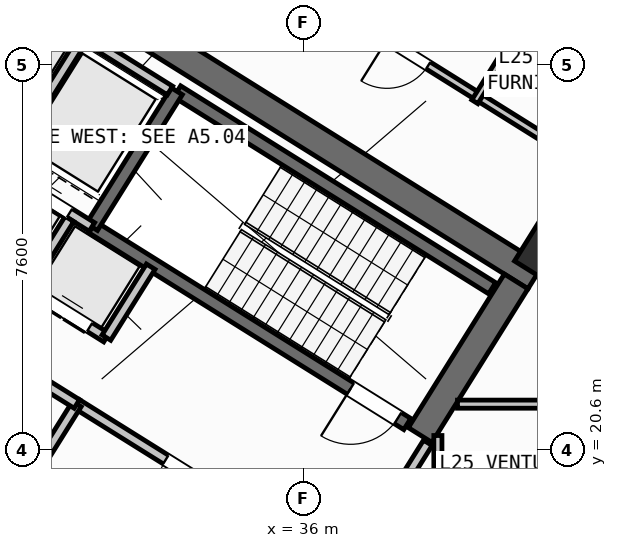
"""IFC4 building model, lengths in metres.
Left out: names, types, materials, properties, quantities, classifications, styles, units other than length and angle.
Written with IfcOpenShell. Run it as: python <this file> out.ifc"""

import sys

from ifc_helpers import new_model, si_unit, direction, frame, frame_2d, origin, origin_2d, place, context, subcontext, project, spatial, rectangle, hollow_rectangle, extrude, source, transform, mapped, element, fill, save


model = new_model("IFC4")
c1 = context("Model", 3, precision=1e-05, world=origin(), true_north=direction((0.0, 1.0)))
c2 = subcontext(c1, "Body", "Model", "MODEL_VIEW")
j1 = project(units=[si_unit("LENGTHUNIT", "METRE"), si_unit("PLANEANGLEUNIT", "RADIAN")], contexts=[c1])
p1 = place(None, origin())
s1 = spatial("IfcSite", under=j1, at=p1, CompositionType="ELEMENT")
p2 = place(p1, origin())
s2 = spatial("IfcBuilding", under=s1, at=p2, CompositionType="ELEMENT")
p3 = place(p2, frame((0.0, 0.0, 100.8)))
s3 = spatial("IfcBuildingStorey", under=s2, at=p3, CompositionType="ELEMENT", Elevation=100.8)
p4 = place(p3, frame((40.573, 24.01, 0.0), z_axis=(0.0, 0.0, 1.0), x_axis=(-0.848047359947, 0.529920442413, 0.0)))
e1 = element("IfcWall", 1, at=p4, inside=s3, PredefinedType="SHEAR", context=c2, shape_type="SweptSolid", body=[
    extrude(rectangle(XDim=13.14, YDim=0.55, at=frame_2d((6.57, 0.0))), origin(), (0.0, 0.0, 1.0), 4.25),
])
p5 = place(p3, frame((40.194, 23.922, 0.0), z_axis=(0.0, 0.0, 1.0), x_axis=(-0.529888438328, -0.848067357541, 0.0)))
e2 = element("IfcWall", 2, at=p5, inside=s3, PredefinedType="SHEAR", context=c2, shape_type="SweptSolid", body=[
    extrude(rectangle(XDim=3.575, YDim=0.55, at=frame_2d((1.788, 0.0))), origin(), (0.0, 0.0, 1.0), 4.25),
])
m1 = source(origin(), c2, "Body", "SweptSolid", [
    extrude(hollow_rectangle(XDim=0.9, YDim=0.9, WallThickness=0.036, at=origin_2d()), origin(), (0.0, 0.0, 1.0), 4.5),
])
p6 = place(p3, frame((40.783, 24.469, 0.0), z_axis=(0.0, 0.0, 1.0), x_axis=(-0.848048096156, 0.529919264233, 0.0)))
e3 = element("IfcColumn", 3, at=p6, inside=s3, PredefinedType="COLUMN", context=c2, shape_type="MappedRepresentation", body=[
    mapped(m1, transform((0.0, 0.0, 0.0), scale=1.0)),
])
p7 = place(p3, frame((31.76, 12.183, 0.0), z_axis=(0.0, 0.0, 1.0), x_axis=(-0.848047074256, 0.529920899612, 0.0)))
e4 = element("IfcWall", 4, at=p7, inside=s3, PredefinedType="STANDARD", context=c2, shape_type="SweptSolid", body=[
    extrude(rectangle(XDim=30.652, YDim=0.32, at=frame_2d((15.326, 0.0))), origin(), (0.0, 0.0, 1.0), 4.25),
])
p8 = place(p7, frame((15.153, 0.0, 0.0)))
e5 = element("IfcOpeningElement", 5, at=p8, cuts=e4, PredefinedType="OPENING", context=c2, shape_type="SweptSolid", body=[
    extrude(rectangle(XDim=1.2, YDim=2.15, at=frame_2d((0.6, 1.075))), frame((0.0, 0.17, 0.0), z_axis=(0.0, -1.0, 0.0), x_axis=(1.0, 0.0, 0.0)), (0.0, 0.0, 1.0), 0.34),
])
p9 = place(p7, frame((1.652, 0.0, 0.65)))
e6 = element("IfcOpeningElement", 6, at=p9, cuts=e4, PredefinedType="OPENING", context=c2, shape_type="SweptSolid", body=[
    extrude(rectangle(XDim=2.8, YDim=2.1, at=frame_2d((1.4, 1.05))), frame((0.0, 0.17, 0.0), z_axis=(0.0, -1.0, 0.0), x_axis=(1.0, 0.0, 0.0)), (0.0, 0.0, 1.0), 0.34),
])
p10 = place(p7, frame((6.856, 0.0, 0.65)))
e7 = element("IfcOpeningElement", 7, at=p10, cuts=e4, PredefinedType="OPENING", context=c2, shape_type="SweptSolid", body=[
    extrude(rectangle(XDim=2.8, YDim=2.1, at=frame_2d((1.4, 1.05))), frame((0.0, 0.17, 0.0), z_axis=(0.0, -1.0, 0.0), x_axis=(1.0, 0.0, 0.0)), (0.0, 0.0, 1.0), 0.34),
])
p11 = place(p7, frame((20.478, 0.0, 0.85)))
e8 = element("IfcOpeningElement", 8, at=p11, cuts=e4, PredefinedType="OPENING", context=c2, shape_type="SweptSolid", body=[
    extrude(rectangle(XDim=1.5, YDim=1.5, at=frame_2d((0.75, 0.75))), frame((0.0, 0.17, 0.0), z_axis=(0.0, -1.0, 0.0), x_axis=(1.0, 0.0, 0.0)), (0.0, 0.0, 1.0), 0.34),
])
p12 = place(p7, frame((26.258, 0.0, 0.65)))
e9 = element("IfcOpeningElement", 9, at=p12, cuts=e4, PredefinedType="OPENING", context=c2, shape_type="SweptSolid", body=[
    extrude(rectangle(XDim=2.8, YDim=2.1, at=frame_2d((1.4, 1.05))), frame((0.0, 0.17, 0.0), z_axis=(0.0, -1.0, 0.0), x_axis=(1.0, 0.0, 0.0)), (0.0, 0.0, 1.0), 0.34),
])
p13 = place(p3, frame((31.28, 18.261, 0.0), z_axis=(0.0, 0.0, 1.0), x_axis=(-0.848051618787, 0.529913626805, 0.0)))
e10 = element("IfcWall", 10, at=p13, inside=s3, PredefinedType="SHEAR", context=c2, shape_type="SweptSolid", body=[
    extrude(rectangle(XDim=7.46, YDim=0.26, at=frame_2d((3.73, 0.0))), origin(), (0.0, 0.0, 1.0), 4.25),
])
p14 = place(p13, frame((0.36, 0.0, 0.0)))
e11 = element("IfcOpeningElement", 11, at=p14, cuts=e10, PredefinedType="OPENING", context=c2, shape_type="SweptSolid", body=[
    extrude(rectangle(XDim=0.86, YDim=2.05, at=frame_2d((0.43, 1.025))), frame((0.0, 0.14, 0.0), z_axis=(0.0, -1.0, 0.0), x_axis=(1.0, 0.0, 0.0)), (0.0, 0.0, 1.0), 0.28),
])
p15 = place(p3, frame((39.721, 23.788, 0.0), z_axis=(0.0, 0.0, 1.0), x_axis=(-0.848054434086, 0.529909121291, 0.0)))
e12 = element("IfcWall", 12, at=p15, inside=s3, PredefinedType="SHEAR", context=c2, shape_type="SweptSolid", body=[
    extrude(rectangle(XDim=7.33, YDim=0.26, at=frame_2d((3.665, 0.0))), origin(), (0.0, 0.0, 1.0), 4.25),
])
p16 = place(p3, frame((38.046, 21.108, 0.0), z_axis=(0.0, 0.0, 1.0), x_axis=(-0.848054434086, 0.529909121291, 0.0)))
e13 = element("IfcWall", 13, at=p16, inside=s3, PredefinedType="SHEAR", context=c2, shape_type="SweptSolid", body=[
    extrude(rectangle(XDim=7.33, YDim=0.26, at=frame_2d((3.665, 0.0))), origin(), (0.0, 0.0, 1.0), 4.25),
])
p17 = place(p16, frame((0.22, 0.0, 0.0)))
e14 = element("IfcOpeningElement", 14, at=p17, cuts=e13, PredefinedType="OPENING", context=c2, shape_type="SweptSolid", body=[
    extrude(rectangle(XDim=1.1, YDim=2.1, at=frame_2d((0.55, 1.05))), frame((0.0, 0.14, 0.0), z_axis=(0.0, -1.0, 0.0), x_axis=(1.0, 0.0, 0.0)), (0.0, 0.0, 1.0), 0.28),
])
p18 = place(p3, frame((33.496, 27.677, 0.0), z_axis=(0.0, 0.0, 1.0), x_axis=(-0.529908658664, -0.84805472316, 0.0)))
e15 = element("IfcWall", 15, at=p18, inside=s3, PredefinedType="SHEAR", context=c2, shape_type="SweptSolid", body=[
    extrude(rectangle(XDim=3.16, YDim=0.26, at=frame_2d((1.58, 0.0))), origin(), (0.0, 0.0, 1.0), 4.25),
])
p19 = place(p3, frame((36.417, 18.447, 0.0), z_axis=(0.0, 0.0, 1.0), x_axis=(-0.848064879198, 0.529892404805, 0.0)))
e16 = element("IfcWall", 16, at=p19, inside=s3, PredefinedType="STANDARD", context=c2, shape_type="SweptSolid", body=[
    extrude(rectangle(XDim=5.768, YDim=0.2, at=frame_2d((2.884, 0.0))), origin(), (0.0, 0.0, 1.0), 4.24),
])
p20 = place(p19, frame((2.548, 0.0, 0.0)))
e17 = element("IfcOpeningElement", 17, at=p20, cuts=e16, PredefinedType="OPENING", context=c2, shape_type="SweptSolid", body=[
    extrude(rectangle(XDim=1.15, YDim=2.1, at=frame_2d((0.575, 1.05))), frame((0.0, 0.11, 0.0), z_axis=(0.0, -1.0, 0.0), x_axis=(1.0, 0.0, 0.0)), (0.0, 0.0, 1.0), 0.22),
])
p21 = place(p3, frame((31.822, 24.998, 0.0), z_axis=(0.0, 0.0, 1.0), x_axis=(-0.848036912365, 0.52993716162, 0.0)))
e18 = element("IfcWall", 18, at=p21, inside=s3, PredefinedType="STANDARD", context=c2, shape_type="SweptSolid", body=[
    extrude(rectangle(XDim=4.618, YDim=0.2, at=frame_2d((2.309, 0.0))), origin(), (0.0, 0.0, 1.0), 4.24),
])
p22 = place(p21, frame((0.52, 0.0, 0.0)))
e19 = element("IfcOpeningElement", 19, at=p22, cuts=e18, PredefinedType="OPENING", context=c2, shape_type="SweptSolid", body=[
    extrude(rectangle(XDim=1.2, YDim=2.15, at=frame_2d((0.6, 1.075))), frame((0.0, 0.11, 0.0), z_axis=(0.0, -1.0, 0.0), x_axis=(1.0, 0.0, 0.0)), (0.0, 0.0, 1.0), 0.22),
])
p23 = place(p21, frame((2.66, 0.0, 0.0)))
e20 = element("IfcOpeningElement", 20, at=p23, cuts=e18, PredefinedType="OPENING", context=c2, shape_type="SweptSolid", body=[
    extrude(rectangle(XDim=1.2, YDim=2.15, at=frame_2d((0.6, 1.075))), frame((0.0, 0.11, 0.0), z_axis=(0.0, -1.0, 0.0), x_axis=(1.0, 0.0, 0.0)), (0.0, 0.0, 1.0), 0.22),
])
p24 = place(p3, frame((32.108, 22.814, 0.0), z_axis=(0.0, 0.0, 1.0), x_axis=(-0.848042229521, 0.529928652696, 0.0)))
e21 = element("IfcWall", 21, at=p24, inside=s3, PredefinedType="STANDARD", context=c2, shape_type="SweptSolid", body=[
    extrude(rectangle(XDim=5.62, YDim=0.2, at=frame_2d((2.81, 0.0))), origin(), (0.0, 0.0, 1.0), 4.24),
])
p25 = place(p24, frame((0.39, 0.0, 0.0)))
e22 = element("IfcOpeningElement", 22, at=p25, cuts=e21, PredefinedType="OPENING", context=c2, shape_type="SweptSolid", body=[
    extrude(rectangle(XDim=1.1, YDim=2.15, at=frame_2d((0.55, 1.075))), frame((0.0, 0.11, 0.0), z_axis=(0.0, -1.0, 0.0), x_axis=(1.0, 0.0, 0.0)), (0.0, 0.0, 1.0), 0.22),
])
p26 = place(p24, frame((2.25, 0.0, 0.0)))
e23 = element("IfcOpeningElement", 23, at=p26, cuts=e21, PredefinedType="OPENING", context=c2, shape_type="SweptSolid", body=[
    extrude(rectangle(XDim=1.1, YDim=2.15, at=frame_2d((0.55, 1.075))), frame((0.0, 0.11, 0.0), z_axis=(0.0, -1.0, 0.0), x_axis=(1.0, 0.0, 0.0)), (0.0, 0.0, 1.0), 0.22),
])
p27 = place(p24, frame((4.11, 0.0, 0.0)))
e24 = element("IfcOpeningElement", 24, at=p27, cuts=e21, PredefinedType="OPENING", context=c2, shape_type="SweptSolid", body=[
    extrude(rectangle(XDim=1.1, YDim=2.15, at=frame_2d((0.55, 1.075))), frame((0.0, 0.11, 0.0), z_axis=(0.0, -1.0, 0.0), x_axis=(1.0, 0.0, 0.0)), (0.0, 0.0, 1.0), 0.22),
])
p28 = place(p3, frame((32.982, 24.213, 0.0), z_axis=(0.0, 0.0, 1.0), x_axis=(-0.529839334948, -0.84809803628, 0.0)))
e25 = element("IfcWall", 25, at=p28, inside=s3, PredefinedType="STANDARD", context=c2, shape_type="SweptSolid", body=[
    extrude(rectangle(XDim=1.65, YDim=0.2, at=frame_2d((0.825, 0.0))), origin(), (0.0, 0.0, 1.0), 4.24),
])
p29 = place(p3, frame((31.645, 28.716, 0.0), z_axis=(0.0, 0.0, 1.0), x_axis=(-0.52986693015, -0.848080795876, 0.0)))
e26 = element("IfcWall", 26, at=p29, inside=s3, PredefinedType="STANDARD", context=c2, shape_type="SweptSolid", body=[
    extrude(rectangle(XDim=2.66, YDim=0.2, at=frame_2d((1.33, 0.0))), origin(), (0.0, 0.0, 1.0), 4.24),
])
p30 = place(p3, frame((33.363, 27.69, 0.0), z_axis=(0.0, 0.0, 1.0), x_axis=(-0.848047090064, 0.529920874315, 0.0)))
e27 = element("IfcWall", 27, at=p30, inside=s3, PredefinedType="STANDARD", context=c2, shape_type="SweptSolid", body=[
    extrude(rectangle(XDim=4.498, YDim=0.2, at=frame_2d((2.249, 0.0))), origin(), (0.0, 0.0, 1.0), 4.24),
])
p31 = place(p3, frame((31.379, 25.156, 0.0), z_axis=(0.0, 0.0, 1.0), x_axis=(-0.529998940003, -0.847998304005, 0.0)))
e28 = element("IfcWall", 28, at=p31, inside=s3, PredefinedType="STANDARD", context=c2, shape_type="SweptSolid", body=[
    extrude(rectangle(XDim=1.58, YDim=0.2, at=frame_2d((0.79, 0.0))), origin(), (0.0, 0.0, 1.0), 4.24),
])
p32 = place(p3, frame((31.525, 21.504, 0.0), z_axis=(0.0, 0.0, 1.0), x_axis=(-0.529907497854, -0.848055448493, 0.0)))
e29 = element("IfcWall", 29, at=p32, inside=s3, PredefinedType="STANDARD", context=c2, shape_type="SweptSolid", body=[
    extrude(rectangle(XDim=2.88, YDim=0.2, at=frame_2d((1.44, 0.0))), origin(), (0.0, 0.0, 1.0), 4.24),
])
p33 = place(p3, frame((31.525, 21.504, 0.0), z_axis=(0.0, 0.0, 1.0), x_axis=(-0.848040211232, 0.529931882541, 0.0)))
e30 = element("IfcWall", 30, at=p33, inside=s3, PredefinedType="STANDARD", context=c2, shape_type="SweptSolid", body=[
    extrude(rectangle(XDim=6.218, YDim=0.2, at=frame_2d((3.109, 0.0))), origin(), (0.0, 0.0, 1.0), 4.24),
])
p34 = place(p33, frame((4.4, 0.0, 0.0)))
e31 = element("IfcOpeningElement", 31, at=p34, cuts=e30, PredefinedType="OPENING", context=c2, shape_type="SweptSolid", body=[
    extrude(rectangle(XDim=0.86, YDim=2.05, at=frame_2d((0.43, 1.025))), frame((0.0, 0.11, 0.0), z_axis=(0.0, -1.0, 0.0), x_axis=(1.0, 0.0, 0.0)), (0.0, 0.0, 1.0), 0.22),
])
p35 = place(p33, frame((1.45, 0.0, 0.0)))
e32 = element("IfcOpeningElement", 32, at=p35, cuts=e30, PredefinedType="OPENING", context=c2, shape_type="SweptSolid", body=[
    extrude(rectangle(XDim=0.86, YDim=2.05, at=frame_2d((0.43, 1.025))), frame((0.0, 0.11, 0.0), z_axis=(0.0, -1.0, 0.0), x_axis=(1.0, 0.0, 0.0)), (0.0, 0.0, 1.0), 0.22),
])
p36 = place(p3, frame((31.239, 38.274, 0.0), z_axis=(0.0, 0.0, 1.0), x_axis=(-0.529918877109, -0.848048338059, 0.0)))
e33 = element("IfcWall", 33, at=p36, inside=s3, PredefinedType="PARTITIONING", context=c2, shape_type="SweptSolid", body=[
    extrude(rectangle(XDim=15.35, YDim=0.16, at=frame_2d((7.675, 0.0))), origin(), (0.0, 0.0, 1.0), 4.24),
])
p37 = place(p3, frame((41.936, 26.012, 0.0), z_axis=(0.0, 0.0, 1.0), x_axis=(-0.848051154596, 0.529914369676, 0.0)))
e34 = element("IfcWall", 34, at=p37, inside=s3, PredefinedType="PARTITIONING", context=c2, shape_type="SweptSolid", body=[
    extrude(rectangle(XDim=15.57, YDim=0.16, at=frame_2d((7.785, 0.0))), origin(), (0.0, 0.0, 1.0), 4.24),
])
p38 = place(p37, frame((4.1, 0.0, 0.0)))
e35 = element("IfcOpeningElement", 35, at=p38, cuts=e34, PredefinedType="OPENING", context=c2, shape_type="SweptSolid", body=[
    extrude(rectangle(XDim=0.96, YDim=2.08, at=frame_2d((0.48, 1.04))), frame((0.0, 0.09, 0.0), z_axis=(0.0, -1.0, 0.0), x_axis=(1.0, 0.0, 0.0)), (0.0, 0.0, 1.0), 0.18),
])
p39 = place(p37, frame((8.2, 0.0, 0.0)))
e36 = element("IfcOpeningElement", 36, at=p39, cuts=e34, PredefinedType="OPENING", context=c2, shape_type="SweptSolid", body=[
    extrude(rectangle(XDim=1.7, YDim=2.2, at=frame_2d((0.85, 1.1))), frame((0.0, 0.09, 0.0), z_axis=(0.0, -1.0, 0.0), x_axis=(1.0, 0.0, 0.0)), (0.0, 0.0, 1.0), 0.18),
])
p40 = place(p3, frame((40.512, 29.281, 0.0), z_axis=(0.0, 0.0, 1.0), x_axis=(-0.529947607416, -0.848030384712, 0.0)))
e37 = element("IfcWall", 37, at=p40, inside=s3, PredefinedType="PLUMBINGWALL", context=c2, shape_type="SweptSolid", body=[
    extrude(rectangle(XDim=2.138, YDim=0.14, at=frame_2d((1.069, 0.0))), origin(), (0.0, 0.0, 1.0), 4.24),
])
p41 = place(p3, frame((38.451, 20.737, 0.0), z_axis=(0.0, 0.0, 1.0), x_axis=(-0.529924799939, -0.848044637038, 0.0)))
e38 = element("IfcWall", 38, at=p41, inside=s3, PredefinedType="STANDARD", context=c2, shape_type="SweptSolid", body=[
    extrude(rectangle(XDim=2.96, YDim=0.2, at=frame_2d((1.48, 0.0))), origin(), (0.0, 0.0, 1.0), 4.24),
])
p42 = place(p41, frame((1.46, 0.0, 0.0)))
e39 = element("IfcOpeningElement", 39, at=p42, cuts=e38, PredefinedType="OPENING", context=c2, shape_type="SweptSolid", body=[
    extrude(rectangle(XDim=0.86, YDim=2.05, at=frame_2d((0.43, 1.025))), frame((0.0, 0.11, 0.0), z_axis=(0.0, -1.0, 0.0), x_axis=(1.0, 0.0, 0.0)), (0.0, 0.0, 1.0), 0.22),
])
p43 = place(p3, frame((38.65, 17.93, 0.0), z_axis=(0.0, 0.0, 1.0), x_axis=(0.0, 1.0, 0.0)))
e40 = element("IfcWall", 40, at=p43, inside=s3, PredefinedType="PARTITIONING", context=c2, shape_type="SweptSolid", body=[
    extrude(rectangle(XDim=2.951, YDim=0.16, at=frame_2d((1.476, 0.0))), origin(), (0.0, 0.0, 1.0), 4.24),
])
p44 = place(p3, frame((39.037, 21.5, 0.0), z_axis=(0.0, 0.0, 1.0), x_axis=(1.0, 0.0, 0.0)))
e41 = element("IfcWall", 41, at=p44, inside=s3, PredefinedType="PARTITIONING", context=c2, shape_type="SweptSolid", body=[
    extrude(rectangle(XDim=7.215, YDim=0.16, at=frame_2d((3.607, 0.0))), origin(), (0.0, 0.0, 1.0), 4.24),
])
m2 = source(origin(), c2, "Body", "SweptSolid", [
    extrude(rectangle(XDim=1.1, YDim=2.1, at=frame_2d((0.55, 1.05))), frame((0.0, 0.025, 0.0), z_axis=(0.0, -1.0, 0.0), x_axis=(1.0, 0.0, 0.0)), (0.0, 0.0, 1.0), 0.05),
])
p45 = place(p17, origin())
e42 = element("IfcDoor", 42, at=p45, inside=s3, OperationType="SINGLE_SWING_RIGHT", PredefinedType="DOOR", context=c2, shape_type="MappedRepresentation", body=[
    mapped(m2, transform((0.0, 0.0, 0.0), scale=1.0)),
])
fill(e14, e42)
m3 = source(origin(), c2, "Body", "SweptSolid", [
    extrude(rectangle(XDim=1.15, YDim=2.1, at=frame_2d((0.575, 1.05))), frame((0.0, 0.025, 0.0), z_axis=(0.0, -1.0, 0.0), x_axis=(1.0, 0.0, 0.0)), (0.0, 0.0, 1.0), 0.05),
])
p46 = place(p20, origin())
e43 = element("IfcDoor", 43, at=p46, inside=s3, OperationType="SINGLE_SWING_LEFT", PredefinedType="DOOR", context=c2, shape_type="MappedRepresentation", body=[
    mapped(m3, transform((0.0, 0.0, 0.0), scale=1.0)),
])
fill(e17, e43)
m4 = source(origin(), c2, "Body", "SweptSolid", [
    extrude(rectangle(XDim=1.2, YDim=2.15, at=frame_2d((0.6, 1.075))), frame((0.0, 0.025, 0.0), z_axis=(0.0, -1.0, 0.0), x_axis=(1.0, 0.0, 0.0)), (0.0, 0.0, 1.0), 0.05),
])
p47 = place(p22, origin())
e44 = element("IfcDoor", 44, at=p47, inside=s3, OperationType="DOUBLE_DOOR_SLIDING", PredefinedType="DOOR", context=c2, shape_type="MappedRepresentation", body=[
    mapped(m4, transform((0.0, 0.0, 0.0), scale=1.0)),
])
fill(e19, e44)
m5 = source(origin(), c2, "Body", "SweptSolid", [
    extrude(rectangle(XDim=1.1, YDim=2.15, at=frame_2d((0.55, 1.075))), frame((0.0, 0.025, 0.0), z_axis=(0.0, -1.0, 0.0), x_axis=(1.0, 0.0, 0.0)), (0.0, 0.0, 1.0), 0.05),
])
p48 = place(p25, origin())
e45 = element("IfcDoor", 45, at=p48, inside=s3, OperationType="DOUBLE_DOOR_SLIDING", PredefinedType="DOOR", context=c2, shape_type="MappedRepresentation", body=[
    mapped(m5, transform((0.0, 0.0, 0.0), scale=1.0)),
])
fill(e22, e45)
m6 = source(origin(), c2, "Body", "SweptSolid", [
    extrude(rectangle(XDim=0.96, YDim=2.08, at=frame_2d((0.48, 1.04))), frame((0.0, 0.025, 0.0), z_axis=(0.0, -1.0, 0.0), x_axis=(1.0, 0.0, 0.0)), (0.0, 0.0, 1.0), 0.05),
])
p49 = place(p38, origin())
e46 = element("IfcDoor", 46, at=p49, inside=s3, OperationType="SINGLE_SWING_RIGHT", PredefinedType="DOOR", context=c2, shape_type="MappedRepresentation", body=[
    mapped(m6, transform((0.0, 0.0, 0.0), scale=1.0)),
])
fill(e35, e46)
save(model, sys.argv[1])
